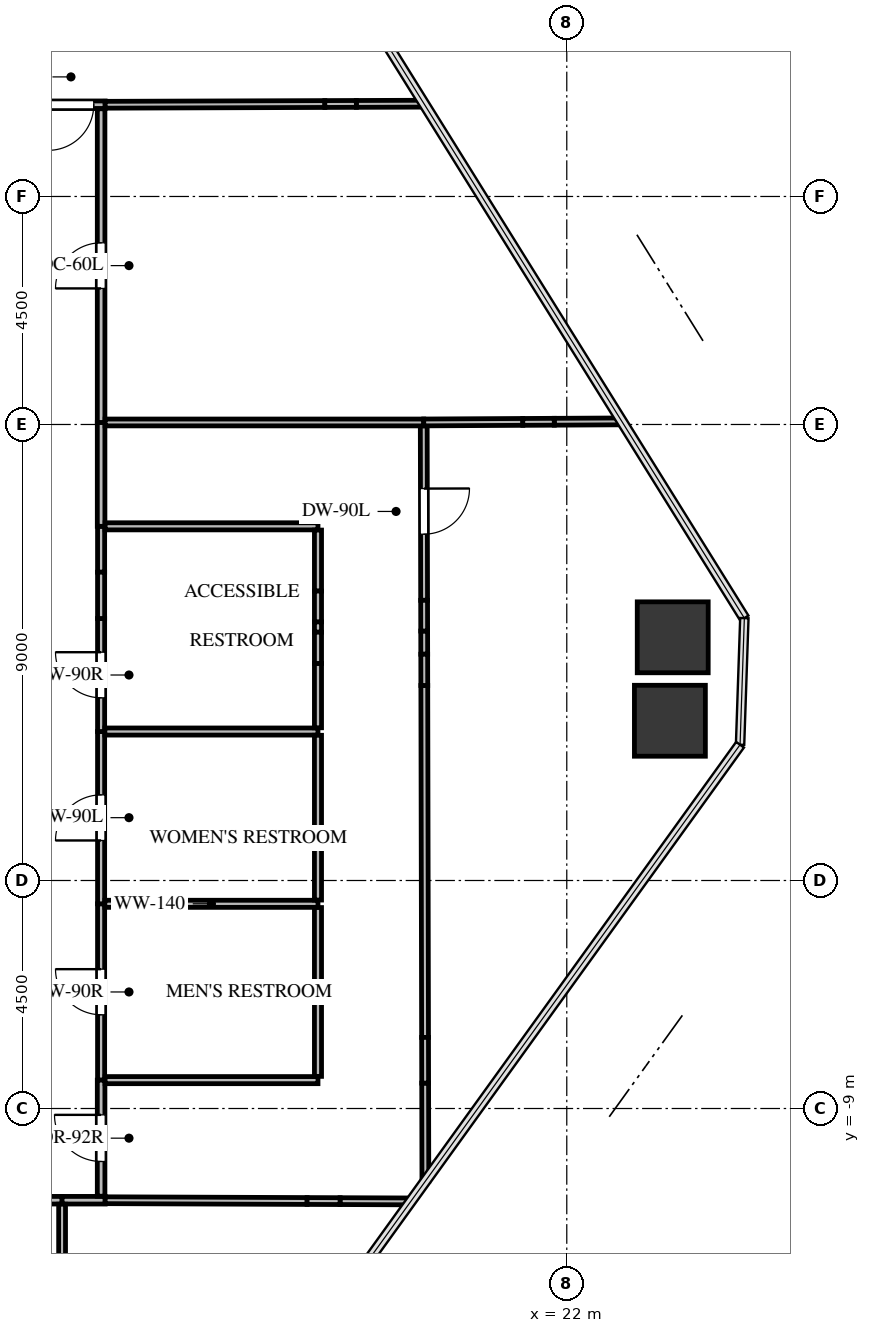
"""IFC4 building model, lengths in metres.
Left out: names, types, materials, properties, quantities, classifications, styles, units other than length and angle.
Written with IfcOpenShell. Run it as: python <this file> out.ifc"""

import sys

from ifc_helpers import new_model, si_unit, direction, frame, frame_2d, origin, origin_2d, place, context, subcontext, project, spatial, rectangle, extrude, source, transform, mapped, element, fill, save


model = new_model("IFC4")
c1 = context("Model", 3, precision=1e-05, world=origin(), true_north=direction((0.0, 1.0)))
c2 = subcontext(c1, "Body", "Model", "MODEL_VIEW")
j1 = project(units=[si_unit("LENGTHUNIT", "METRE"), si_unit("PLANEANGLEUNIT", "RADIAN")], contexts=[c1])
p1 = place(None, origin())
s1 = spatial("IfcSite", under=j1, at=p1, CompositionType="ELEMENT")
p2 = place(p1, origin())
s2 = spatial("IfcBuilding", under=s1, at=p2, CompositionType="ELEMENT")
p3 = place(p2, frame((0.0, 0.0, 78.3)))
s3 = spatial("IfcBuildingStorey", under=s2, at=p3, CompositionType="ELEMENT", Elevation=78.3)
m1 = source(origin(), c2, "Body", "SweptSolid", [
    extrude(rectangle(XDim=1.4, YDim=1.4, at=origin_2d()), origin(), (0.0, 0.0, 1.0), 3.0),
])
for number, where, z_axis, x_axis in (
    (1, (24.091, 0.3, -0.24), (0.0, 0.0, 1.0), (1.0, 0.0, 0.0)),
    (2, (24.035, -1.347, -0.24), (0.0, 0.0, 1.0), (1.0, 0.0, 0.0)),
):
    element("IfcColumn", number, at=place(p3, frame(where, z_axis=z_axis, x_axis=x_axis)), inside=s3, PredefinedType="COLUMN", context=c2, shape_type="MappedRepresentation", body=[
        mapped(m1, transform((0.0, 0.0, 0.0), x_axis=(1.0, 0.0, 0.0), y_axis=(0.0, 1.0, 0.0), z_axis=(0.0, 0.0, 1.0), scale=1.0)),
    ])
p4 = place(p3, frame((12.81, -8.44, 0.0), z_axis=(0.0, 0.0, 1.0), x_axis=(0.0, 1.0, 0.0)))
e3 = element("IfcWall", 3, at=p4, inside=s3, PredefinedType="PARTITIONING", context=c2, shape_type="SweptSolid", body=[
    extrude(rectangle(XDim=3.48, YDim=0.14, at=frame_2d((1.74, 0.0))), origin(), (0.0, 0.0, 1.0), 2.745),
])
p5 = place(p4, frame((1.29, 0.0, 0.0)))
e4 = element("IfcOpeningElement", 4, at=p5, cuts=e3, PredefinedType="OPENING", context=c2, shape_type="SweptSolid", body=[
    extrude(rectangle(XDim=0.9, YDim=2.05, at=frame_2d((0.45, 1.025))), frame((0.0, 0.08, 0.0), z_axis=(0.0, -1.0, 0.0), x_axis=(1.0, 0.0, 0.0)), (0.0, 0.0, 1.0), 0.16),
])
p6 = place(p3, frame((12.81, -4.96, 0.0), z_axis=(0.0, 0.0, 1.0), x_axis=(0.0, 1.0, 0.0)))
e5 = element("IfcWall", 5, at=p6, inside=s3, PredefinedType="PARTITIONING", context=c2, shape_type="SweptSolid", body=[
    extrude(rectangle(XDim=3.4, YDim=0.14, at=frame_2d((1.7, 0.0))), origin(), (0.0, 0.0, 1.0), 2.745),
])
p7 = place(p6, frame((1.25, 0.0, 0.0)))
e6 = element("IfcOpeningElement", 6, at=p7, cuts=e5, PredefinedType="OPENING", context=c2, shape_type="SweptSolid", body=[
    extrude(rectangle(XDim=0.9, YDim=2.05, at=frame_2d((0.45, 1.025))), frame((0.0, 0.08, 0.0), z_axis=(0.0, -1.0, 0.0), x_axis=(1.0, 0.0, 0.0)), (0.0, 0.0, 1.0), 0.16),
])
p8 = place(p3, frame((12.81, -1.56, 0.0), z_axis=(0.0, 0.0, 1.0), x_axis=(0.0, 1.0, 0.0)))
e7 = element("IfcWall", 7, at=p8, inside=s3, PredefinedType="PARTITIONING", context=c2, shape_type="SweptSolid", body=[
    extrude(rectangle(XDim=2.231, YDim=0.14, at=frame_2d((1.116, 0.0))), origin(), (0.0, 0.0, 1.0), 2.745),
])
p9 = place(p8, frame((0.666, 0.0, 0.0)))
e8 = element("IfcOpeningElement", 8, at=p9, cuts=e7, PredefinedType="OPENING", context=c2, shape_type="SweptSolid", body=[
    extrude(rectangle(XDim=0.9, YDim=2.05, at=frame_2d((0.45, 1.025))), frame((0.0, 0.08, 0.0), z_axis=(0.0, -1.0, 0.0), x_axis=(1.0, 0.0, 0.0)), (0.0, 0.0, 1.0), 0.16),
])
p10 = place(p3, frame((12.81, 1.585, 0.0), z_axis=(0.0, 0.0, 1.0), x_axis=(0.0, 1.0, 0.0)))
e9 = element("IfcWall", 9, at=p10, inside=s3, PredefinedType="PARTITIONING", context=c2, shape_type="SweptSolid", body=[
    extrude(rectangle(XDim=0.905, YDim=0.14, at=frame_2d((0.453, 0.0))), origin(), (0.0, 0.0, 1.0), 2.745),
])
p11 = place(p3, frame((12.81, 0.671, 0.0), z_axis=(0.0, 0.0, 1.0), x_axis=(0.0, 1.0, 0.0)))
e10 = element("IfcWall", 10, at=p11, inside=s3, PredefinedType="PARTITIONING", context=c2, shape_type="SweptSolid", body=[
    extrude(rectangle(XDim=0.914, YDim=0.14, at=frame_2d((0.457, 0.0))), origin(), (0.0, 0.0, 1.0), 1.83),
])
p12 = place(p3, frame((12.89, 10.81, 0.0), z_axis=(0.0, 0.0, 1.0), x_axis=(-1.0, 0.0, 0.0)))
e11 = element("IfcWall", 11, at=p12, inside=s3, PredefinedType="PARTITIONING", context=c2, shape_type="SweptSolid", body=[
    extrude(rectangle(XDim=1.35, YDim=0.15, at=frame_2d((0.675, 0.0))), origin(), (0.0, 0.0, 1.0), 2.745),
])
p13 = place(p12, frame((0.225, 0.0, 0.0)))
e12 = element("IfcOpeningElement", 12, at=p13, cuts=e11, PredefinedType="OPENING", context=c2, shape_type="SweptSolid", body=[
    extrude(rectangle(XDim=0.9, YDim=2.05, at=frame_2d((0.45, 1.025))), frame((0.0, 0.085, 0.0), z_axis=(0.0, -1.0, 0.0), x_axis=(1.0, 0.0, 0.0)), (0.0, 0.0, 1.0), 0.17),
])
p14 = place(p3, frame((5.817, -10.81, 0.0), z_axis=(0.0, 0.0, 1.0), x_axis=(1.0, 0.0, 0.0)))
e13 = element("IfcWall", 13, at=p14, inside=s3, PredefinedType="PARTITIONING", context=c2, shape_type="SweptSolid", body=[
    extrude(rectangle(XDim=6.223, YDim=0.15, at=frame_2d((3.111, 0.0))), origin(), (0.0, 0.0, 1.0), 1.83),
])
p15 = place(p3, frame((12.04, -10.81, 0.0), z_axis=(0.0, 0.0, 1.0), x_axis=(1.0, 0.0, 0.0)))
e14 = element("IfcWall", 14, at=p15, inside=s3, PredefinedType="PARTITIONING", context=c2, shape_type="SweptSolid", body=[
    extrude(rectangle(XDim=0.85, YDim=0.15, at=frame_2d((0.425, 0.0))), origin(), (0.0, 0.0, 1.0), 2.745),
])
p16 = place(p3, frame((12.81, -10.731, 0.0), z_axis=(0.0, 0.0, 1.0), x_axis=(0.0, 1.0, 0.0)))
e15 = element("IfcWall", 15, at=p16, inside=s3, PredefinedType="PARTITIONING", context=c2, shape_type="SweptSolid", body=[
    extrude(rectangle(XDim=2.291, YDim=0.15, at=frame_2d((1.146, 0.0))), origin(), (0.0, 0.0, 1.0), 2.745),
])
p17 = place(p16, frame((0.686, 0.0, 0.0)))
e16 = element("IfcOpeningElement", 16, at=p17, cuts=e15, PredefinedType="OPENING", context=c2, shape_type="SweptSolid", body=[
    extrude(rectangle(XDim=0.92, YDim=2.1, at=frame_2d((0.46, 1.05))), frame((0.0, 0.085, 0.0), z_axis=(0.0, -1.0, 0.0), x_axis=(1.0, 0.0, 0.0)), (0.0, 0.0, 1.0), 0.17),
])
p18 = place(p3, frame((12.81, 2.49, 0.0), z_axis=(0.0, 0.0, 1.0), x_axis=(0.0, 1.0, 0.0)))
e17 = element("IfcWall", 17, at=p18, inside=s3, PredefinedType="PARTITIONING", context=c2, shape_type="SweptSolid", body=[
    extrude(rectangle(XDim=2.05, YDim=0.15, at=frame_2d((1.025, 0.0))), origin(), (0.0, 0.0, 1.0), 2.745),
])
p19 = place(p3, frame((12.81, 4.54, 0.0), z_axis=(0.0, 0.0, 1.0), x_axis=(0.0, 1.0, 0.0)))
e18 = element("IfcWall", 18, at=p19, inside=s3, PredefinedType="PARTITIONING", context=c2, shape_type="SweptSolid", body=[
    extrude(rectangle(XDim=6.191, YDim=0.15, at=frame_2d((3.095, 0.0))), origin(), (0.0, 0.0, 1.0), 2.745),
])
p20 = place(p19, frame((2.646, 0.0, 0.0)))
e19 = element("IfcOpeningElement", 19, at=p20, cuts=e18, PredefinedType="OPENING", context=c2, shape_type="SweptSolid", body=[
    extrude(rectangle(XDim=0.9, YDim=2.05, at=frame_2d((0.45, 1.025))), frame((0.0, 0.085, 0.0), z_axis=(0.0, -1.0, 0.0), x_axis=(1.0, 0.0, 0.0)), (0.0, 0.0, 1.0), 0.17),
])
p21 = place(p3, frame((12.884, -4.96, 0.0), z_axis=(0.0, 0.0, 1.0), x_axis=(1.0, 0.0, 0.0)))
e20 = element("IfcWall", 20, at=p21, inside=s3, PredefinedType="PARTITIONING", context=c2, shape_type="SweptSolid", body=[
    extrude(rectangle(XDim=4.206, YDim=0.14, at=frame_2d((2.103, 0.0))), origin(), (0.0, 0.0, 1.0), 2.745),
])
p22 = place(p3, frame((17.09, -8.44, 0.0), z_axis=(0.0, 0.0, 1.0), x_axis=(-1.0, 0.0, 0.0)))
e21 = element("IfcWall", 21, at=p22, inside=s3, PredefinedType="PARTITIONING", context=c2, shape_type="SweptSolid", body=[
    extrude(rectangle(XDim=4.201, YDim=0.14, at=frame_2d((2.101, 0.0))), origin(), (0.0, 0.0, 1.0), 2.745),
])
p23 = place(p3, frame((17.09, -5.034, 0.0), z_axis=(0.0, 0.0, 1.0), x_axis=(0.0, -1.0, 0.0)))
e22 = element("IfcWall", 22, at=p23, inside=s3, PredefinedType="PARTITIONING", context=c2, shape_type="SweptSolid", body=[
    extrude(rectangle(XDim=3.332, YDim=0.14, at=frame_2d((1.666, 0.0))), origin(), (0.0, 0.0, 1.0), 2.745),
])
p24 = place(p3, frame((12.884, -1.56, 0.0), z_axis=(0.0, 0.0, 1.0), x_axis=(1.0, 0.0, 0.0)))
e23 = element("IfcWall", 23, at=p24, inside=s3, PredefinedType="PARTITIONING", context=c2, shape_type="SweptSolid", body=[
    extrude(rectangle(XDim=4.206, YDim=0.14, at=frame_2d((2.103, 0.0))), origin(), (0.0, 0.0, 1.0), 2.745),
])
p25 = place(p3, frame((17.09, -1.634, 0.0), z_axis=(0.0, 0.0, 1.0), x_axis=(0.0, -1.0, 0.0)))
e24 = element("IfcWall", 24, at=p25, inside=s3, PredefinedType="PARTITIONING", context=c2, shape_type="SweptSolid", body=[
    extrude(rectangle(XDim=3.252, YDim=0.14, at=frame_2d((1.626, 0.0))), origin(), (0.0, 0.0, 1.0), 2.745),
])
p26 = place(p3, frame((12.889, 2.49, 0.0), z_axis=(0.0, 0.0, 1.0), x_axis=(1.0, 0.0, 0.0)))
e25 = element("IfcWall", 25, at=p26, inside=s3, PredefinedType="PARTITIONING", context=c2, shape_type="SweptSolid", body=[
    extrude(rectangle(XDim=4.201, YDim=0.14, at=frame_2d((2.101, 0.0))), origin(), (0.0, 0.0, 1.0), 2.745),
])
p27 = place(p3, frame((17.09, 2.416, 0.0), z_axis=(0.0, 0.0, 1.0), x_axis=(0.0, -1.0, 0.0)))
e26 = element("IfcWall", 26, at=p27, inside=s3, PredefinedType="PARTITIONING", context=c2, shape_type="SweptSolid", body=[
    extrude(rectangle(XDim=1.204, YDim=0.14, at=frame_2d((0.602, 0.0))), origin(), (0.0, 0.0, 1.0), 2.745),
])
p28 = place(p3, frame((17.09, 0.606, 0.0), z_axis=(0.0, 0.0, 1.0), x_axis=(0.0, -1.0, 0.0)))
e27 = element("IfcWall", 27, at=p28, inside=s3, PredefinedType="PARTITIONING", context=c2, shape_type="SweptSolid", body=[
    extrude(rectangle(XDim=0.205, YDim=0.14, at=frame_2d((0.103, 0.0))), origin(), (0.0, 0.0, 1.0), 2.745),
])
p29 = place(p3, frame((17.09, -0.216, 0.0), z_axis=(0.0, 0.0, 1.0), x_axis=(0.0, -1.0, 0.0)))
e28 = element("IfcWall", 28, at=p29, inside=s3, PredefinedType="PARTITIONING", context=c2, shape_type="SweptSolid", body=[
    extrude(rectangle(XDim=1.27, YDim=0.14, at=frame_2d((0.635, 0.0))), origin(), (0.0, 0.0, 1.0), 2.745),
])
p30 = place(p3, frame((17.09, 1.212, 0.0), z_axis=(0.0, 0.0, 1.0), x_axis=(0.0, -1.0, 0.0)))
e29 = element("IfcWall", 29, at=p30, inside=s3, PredefinedType="PARTITIONING", context=c2, shape_type="SweptSolid", body=[
    extrude(rectangle(XDim=0.606, YDim=0.14, at=frame_2d((0.303, 0.0))), origin(), (0.0, 0.0, 1.0), 1.83),
])
p31 = place(p3, frame((17.09, 0.401, 0.0), z_axis=(0.0, 0.0, 1.0), x_axis=(0.0, -1.0, 0.0)))
e30 = element("IfcWall", 30, at=p31, inside=s3, PredefinedType="PARTITIONING", context=c2, shape_type="SweptSolid", body=[
    extrude(rectangle(XDim=0.617, YDim=0.14, at=frame_2d((0.309, 0.0))), origin(), (0.0, 0.0, 1.0), 1.83),
])
p32 = place(p3, frame((19.182, 10.831, 0.0), z_axis=(0.0, 0.0, 1.0), x_axis=(-0.999994579825, -0.00329246432, 0.0)))
e31 = element("IfcWall", 31, at=p32, inside=s3, PredefinedType="PARTITIONING", context=c2, shape_type="SweptSolid", body=[
    extrude(rectangle(XDim=1.335, YDim=0.135, at=frame_2d((0.667, 0.0))), origin(), (0.0, 0.0, 1.0), 2.745),
])
p33 = place(p3, frame((17.225, 10.825, 0.0), z_axis=(0.0, 0.0, 1.0), x_axis=(-0.999994480721, -0.003322427884, 0.0)))
e32 = element("IfcWall", 32, at=p33, inside=s3, PredefinedType="PARTITIONING", context=c2, shape_type="SweptSolid", body=[
    extrude(rectangle(XDim=4.335, YDim=0.135, at=frame_2d((2.168, 0.0))), origin(), (0.0, 0.0, 1.0), 2.745),
])
p34 = place(p3, frame((17.847, 10.827, 0.0), z_axis=(0.0, 0.0, 1.0), x_axis=(-0.999993761903, -0.00353216007, 0.0)))
e33 = element("IfcWall", 33, at=p34, inside=s3, PredefinedType="PARTITIONING", context=c2, shape_type="SweptSolid", body=[
    extrude(rectangle(XDim=0.622, YDim=0.135, at=frame_2d((0.311, 0.0))), origin(), (0.0, 0.0, 1.0), 2.08),
])
p35 = place(p3, frame((12.04, -10.889, 0.0), z_axis=(0.0, 0.0, 1.0), x_axis=(0.0, -1.0, 0.0)))
e34 = element("IfcWall", 34, at=p35, inside=s3, PredefinedType="PARTITIONING", context=c2, shape_type="SweptSolid", body=[
    extrude(rectangle(XDim=4.584, YDim=0.135, at=frame_2d((2.292, 0.0))), origin(), (0.0, 0.0, 1.0), 2.745),
])
p36 = place(p35, frame((1.842, 0.0, 0.0)))
e35 = element("IfcOpeningElement", 35, at=p36, cuts=e34, PredefinedType="OPENING", context=c2, shape_type="SweptSolid", body=[
    extrude(rectangle(XDim=0.9, YDim=2.05, at=frame_2d((0.45, 1.025))), frame((0.0, 0.078, 0.0), z_axis=(0.0, -1.0, 0.0), x_axis=(1.0, 0.0, 0.0)), (0.0, 0.0, 1.0), 0.155),
])
p37 = place(p3, frame((12.89, -10.81, 0.0), z_axis=(0.0, 0.0, 1.0), x_axis=(0.999992552799, -0.003859319458, 0.0)))
e36 = element("IfcWall", 36, at=p37, inside=s3, PredefinedType="PARTITIONING", context=c2, shape_type="SweptSolid", body=[
    extrude(rectangle(XDim=3.985, YDim=0.135, at=frame_2d((1.993, 0.0))), origin(), (0.0, 0.0, 1.0), 2.745),
])
p38 = place(p3, frame((17.526, -10.828, 0.0), z_axis=(0.0, 0.0, 1.0), x_axis=(0.999992598457, -0.003847470648, 0.0)))
e37 = element("IfcWall", 37, at=p38, inside=s3, PredefinedType="PARTITIONING", context=c2, shape_type="SweptSolid", body=[
    extrude(rectangle(XDim=1.396, YDim=0.135, at=frame_2d((0.698, 0.0))), origin(), (0.0, 0.0, 1.0), 2.745),
])
p39 = place(p3, frame((16.875, -10.826, 0.0), z_axis=(0.0, 0.0, 1.0), x_axis=(0.999992960027, -0.003752318799, 0.0)))
e38 = element("IfcWall", 38, at=p39, inside=s3, PredefinedType="PARTITIONING", context=c2, shape_type="SweptSolid", body=[
    extrude(rectangle(XDim=0.651, YDim=0.135, at=frame_2d((0.325, 0.0))), origin(), (0.0, 0.0, 1.0), 2.08),
])
p40 = place(p3, frame((19.177, 4.54, 0.0), z_axis=(0.0, 0.0, 1.0), x_axis=(0.002156066765, -0.999997675685, 0.0)))
e39 = element("IfcWall", 39, at=p40, inside=s3, PredefinedType="PARTITIONING", context=c2, shape_type="SweptSolid", body=[
    extrude(rectangle(XDim=3.51, YDim=0.135, at=frame_2d((1.755, 0.0))), origin(), (0.0, 0.0, 1.0), 2.745),
])
p41 = place(p40, frame((1.305, 0.0, 0.0)))
e40 = element("IfcOpeningElement", 40, at=p41, cuts=e39, PredefinedType="OPENING", context=c2, shape_type="SweptSolid", body=[
    extrude(rectangle(XDim=0.9, YDim=2.05, at=frame_2d((0.45, 1.025))), frame((0.0, 0.078, 0.0), z_axis=(0.0, -1.0, 0.0), x_axis=(1.0, 0.0, 0.0)), (0.0, 0.0, 1.0), 0.155),
])
p42 = place(p3, frame((19.186, 0.424, 0.0), z_axis=(0.0, 0.0, 1.0), x_axis=(0.002668080151, -0.999996440668, 0.0)))
e41 = element("IfcWall", 41, at=p42, inside=s3, PredefinedType="PARTITIONING", context=c2, shape_type="SweptSolid", body=[
    extrude(rectangle(XDim=0.458, YDim=0.135, at=frame_2d((0.229, 0.0))), origin(), (0.0, 0.0, 1.0), 2.745),
])
p43 = place(p3, frame((19.188, -0.651, 0.0), z_axis=(0.0, 0.0, 1.0), x_axis=(0.002179256688, -0.999997625417, 0.0)))
e42 = element("IfcWall", 42, at=p43, inside=s3, PredefinedType="PARTITIONING", context=c2, shape_type="SweptSolid", body=[
    extrude(rectangle(XDim=6.946, YDim=0.135, at=frame_2d((3.473, 0.0))), origin(), (0.0, 0.0, 1.0), 2.08),
])
p44 = place(p3, frame((19.205, -8.499, 0.0), z_axis=(0.0, 0.0, 1.0), x_axis=(0.002270428053, -0.999997422575, 0.0)))
e43 = element("IfcWall", 43, at=p44, inside=s3, PredefinedType="PARTITIONING", context=c2, shape_type="SweptSolid", body=[
    extrude(rectangle(XDim=1.936, YDim=0.135, at=frame_2d((0.968, 0.0))), origin(), (0.0, 0.0, 1.0), 2.08),
])
p45 = place(p3, frame((19.185, 1.03, 0.0), z_axis=(0.0, 0.0, 1.0), x_axis=(0.00201368903, -0.999997972526, 0.0)))
e44 = element("IfcWall", 44, at=p45, inside=s3, PredefinedType="PARTITIONING", context=c2, shape_type="SweptSolid", body=[
    extrude(rectangle(XDim=0.606, YDim=0.135, at=frame_2d((0.303, 0.0))), origin(), (0.0, 0.0, 1.0), 1.83),
])
p46 = place(p3, frame((19.187, -0.034, 0.0), z_axis=(0.0, 0.0, 1.0), x_axis=(0.001978626914, -0.999998042516, 0.0)))
e45 = element("IfcWall", 45, at=p46, inside=s3, PredefinedType="PARTITIONING", context=c2, shape_type="SweptSolid", body=[
    extrude(rectangle(XDim=0.617, YDim=0.135, at=frame_2d((0.309, 0.0))), origin(), (0.0, 0.0, 1.0), 1.83),
])
p47 = place(p3, frame((19.203, -7.597, 0.0), z_axis=(0.0, 0.0, 1.0), x_axis=(0.001894448563, -0.999998205531, 0.0)))
e46 = element("IfcWall", 46, at=p47, inside=s3, PredefinedType="PARTITIONING", context=c2, shape_type="SweptSolid", body=[
    extrude(rectangle(XDim=0.902, YDim=0.135, at=frame_2d((0.451, 0.0))), origin(), (0.0, 0.0, 1.0), 2.08),
])
p48 = place(p3, frame((12.889, 4.54, 0.0), z_axis=(0.0, 0.0, 1.0), x_axis=(1.0, 0.0, 0.0)))
e47 = element("IfcWall", 47, at=p48, inside=s3, PredefinedType="PARTITIONING", context=c2, shape_type="SweptSolid", body=[
    extrude(rectangle(XDim=6.288, YDim=0.135, at=frame_2d((3.144, 0.0))), origin(), (0.0, 0.0, 1.0), 2.745),
])
p49 = place(p3, frame((19.177, 4.54, 0.0), z_axis=(0.0, 0.0, 1.0), x_axis=(0.999985583847, 0.00536955296, 0.0)))
e48 = element("IfcWall", 48, at=p49, inside=s3, PredefinedType="PARTITIONING", context=c2, shape_type="SweptSolid", body=[
    extrude(rectangle(XDim=1.955, YDim=0.135, at=frame_2d((0.978, 0.0))), origin(), (0.0, 0.0, 1.0), 2.745),
])
p50 = place(p3, frame((21.753, 4.554, 0.0), z_axis=(0.0, 0.0, 1.0), x_axis=(0.999985895051, 0.005311280395, 0.0)))
e49 = element("IfcWall", 49, at=p50, inside=s3, PredefinedType="PARTITIONING", context=c2, shape_type="SweptSolid", body=[
    extrude(rectangle(XDim=1.333, YDim=0.135, at=frame_2d((0.667, 0.0))), origin(), (0.0, 0.0, 1.0), 2.745),
])
p51 = place(p3, frame((21.132, 4.551, 0.0), z_axis=(0.0, 0.0, 1.0), x_axis=(0.999986954142, 0.005107988371, 0.0)))
e50 = element("IfcWall", 50, at=p51, inside=s3, PredefinedType="PARTITIONING", context=c2, shape_type="SweptSolid", body=[
    extrude(rectangle(XDim=0.621, YDim=0.135, at=frame_2d((0.311, 0.0))), origin(), (0.0, 0.0, 1.0), 2.08),
])
m2 = source(origin(), c2, "Body", "SweptSolid", [
    extrude(rectangle(XDim=0.9, YDim=2.05, at=frame_2d((0.45, 1.025))), frame((0.0, 0.025, 0.0), z_axis=(0.0, -1.0, 0.0), x_axis=(1.0, 0.0, 0.0)), (0.0, 0.0, 1.0), 0.05),
])
p52 = place(p5, origin())
e51 = element("IfcDoor", 51, at=p52, inside=s3, OperationType="SINGLE_SWING_RIGHT", PredefinedType="DOOR", context=c2, shape_type="MappedRepresentation", body=[
    mapped(m2, transform((0.0, 0.0, 0.0), x_axis=(1.0, 0.0, 0.0), y_axis=(0.0, 1.0, 0.0), z_axis=(0.0, 0.0, 1.0), scale=1.0)),
])
fill(e4, e51)
m3 = source(origin(), c2, "Body", "SweptSolid", [
    extrude(rectangle(XDim=0.9, YDim=2.05, at=frame_2d((0.45, 1.025))), frame((0.0, 0.025, 0.0), z_axis=(0.0, -1.0, 0.0), x_axis=(1.0, 0.0, 0.0)), (0.0, 0.0, 1.0), 0.05),
])
p53 = place(p7, origin())
e52 = element("IfcDoor", 52, at=p53, inside=s3, OperationType="SINGLE_SWING_LEFT", PredefinedType="DOOR", context=c2, shape_type="MappedRepresentation", body=[
    mapped(m3, transform((0.0, 0.0, 0.0), x_axis=(1.0, 0.0, 0.0), y_axis=(0.0, 1.0, 0.0), z_axis=(0.0, 0.0, 1.0), scale=1.0)),
])
fill(e6, e52)
p54 = place(p9, origin())
e53 = element("IfcDoor", 53, at=p54, inside=s3, OperationType="SINGLE_SWING_RIGHT", PredefinedType="DOOR", context=c2, shape_type="MappedRepresentation", body=[
    mapped(m2, transform((0.0, 0.0, 0.0), x_axis=(1.0, 0.0, 0.0), y_axis=(0.0, 1.0, 0.0), z_axis=(0.0, 0.0, 1.0), scale=1.0)),
])
fill(e8, e53)
p55 = place(p13, origin())
e54 = element("IfcDoor", 54, at=p55, inside=s3, OperationType="SINGLE_SWING_RIGHT", PredefinedType="DOOR", context=c2, shape_type="MappedRepresentation", body=[
    mapped(m2, transform((0.0, 0.0, 0.0), x_axis=(1.0, 0.0, 0.0), y_axis=(0.0, 1.0, 0.0), z_axis=(0.0, 0.0, 1.0), scale=1.0)),
])
fill(e12, e54)
m4 = source(origin(), c2, "Body", "SweptSolid", [
    extrude(rectangle(XDim=0.92, YDim=2.1, at=frame_2d((0.46, 1.05))), frame((0.0, 0.025, 0.0), z_axis=(0.0, -1.0, 0.0), x_axis=(1.0, 0.0, 0.0)), (0.0, 0.0, 1.0), 0.05),
])
p56 = place(p17, origin())
e55 = element("IfcDoor", 55, at=p56, inside=s3, OperationType="SINGLE_SWING_RIGHT", PredefinedType="DOOR", context=c2, shape_type="MappedRepresentation", body=[
    mapped(m4, transform((0.0, 0.0, 0.0), x_axis=(1.0, 0.0, 0.0), y_axis=(0.0, 1.0, 0.0), z_axis=(0.0, 0.0, 1.0), scale=1.0)),
])
fill(e16, e55)
m5 = source(origin(), c2, "Body", "SweptSolid", [
    extrude(rectangle(XDim=0.9, YDim=2.05, at=frame_2d((0.45, 1.025))), frame((0.0, 0.025, 0.0), z_axis=(0.0, -1.0, 0.0), x_axis=(1.0, 0.0, 0.0)), (0.0, 0.0, 1.0), 0.05),
])
p57 = place(p20, origin())
e56 = element("IfcDoor", 56, at=p57, inside=s3, OperationType="SINGLE_SWING_LEFT", PredefinedType="DOOR", context=c2, shape_type="MappedRepresentation", body=[
    mapped(m5, transform((0.0, 0.0, 0.0), x_axis=(1.0, 0.0, 0.0), y_axis=(0.0, 1.0, 0.0), z_axis=(0.0, 0.0, 1.0), scale=1.0)),
])
fill(e19, e56)
p58 = place(p41, origin())
e57 = element("IfcDoor", 57, at=p58, inside=s3, OperationType="SINGLE_SWING_LEFT", PredefinedType="DOOR", context=c2, shape_type="MappedRepresentation", body=[
    mapped(m3, transform((0.0, 0.0, 0.0), x_axis=(1.0, 0.0, 0.0), y_axis=(0.0, 1.0, 0.0), z_axis=(0.0, 0.0, 1.0), scale=1.0)),
])
fill(e40, e57)
save(model, sys.argv[1])
